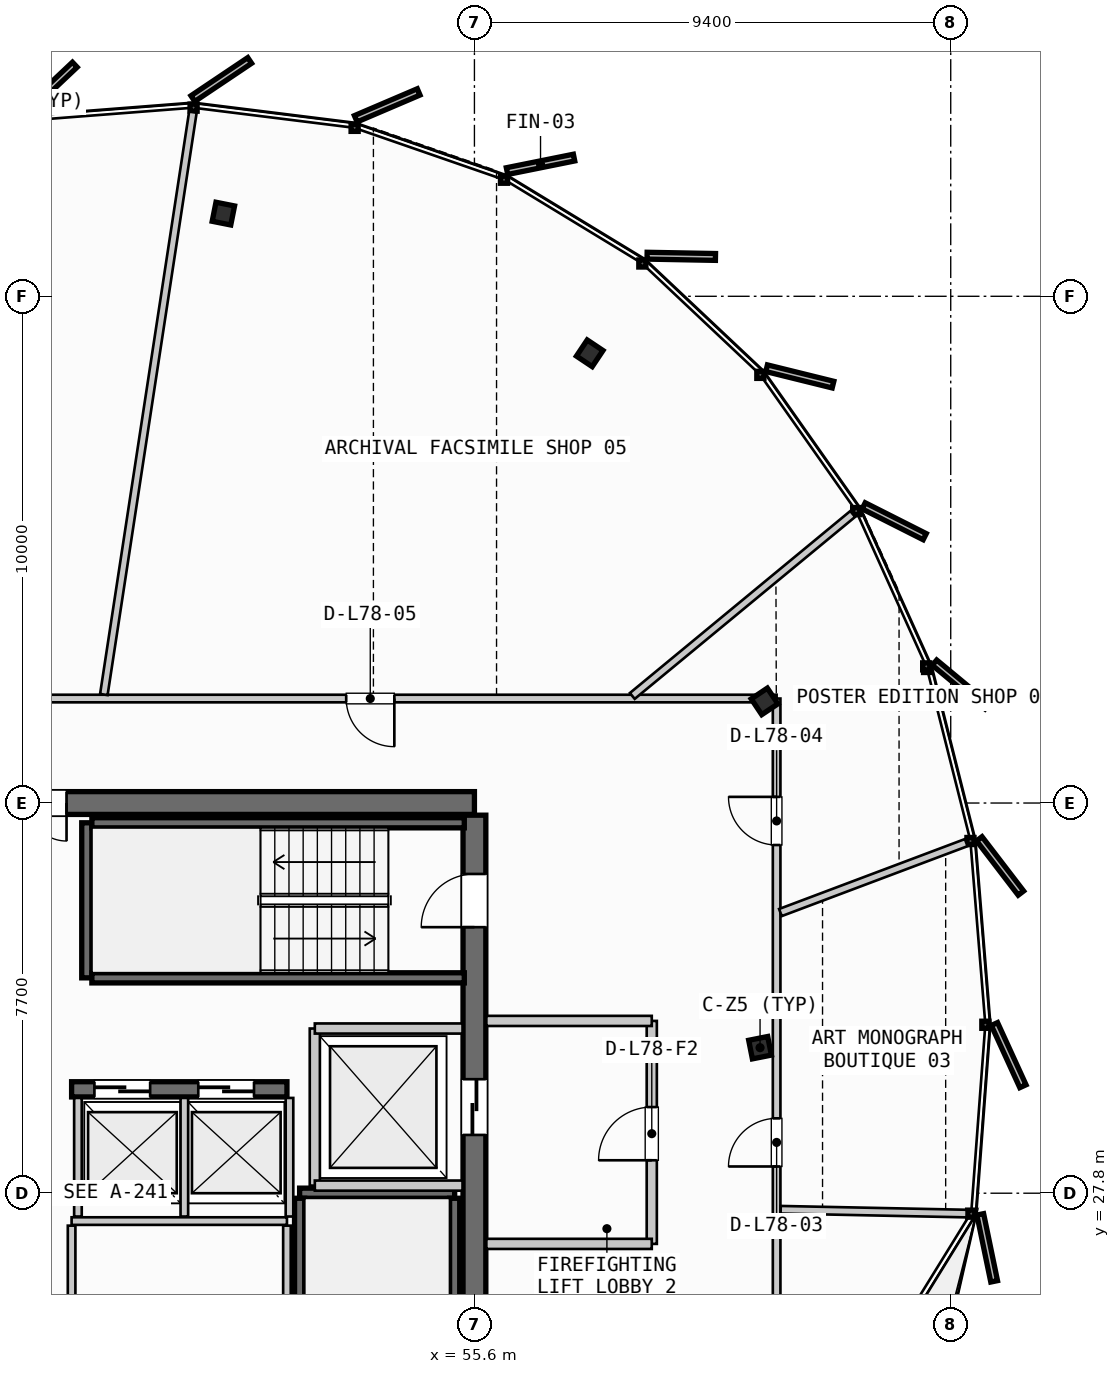
"""IFC4 building model, lengths in metres.
Left out: names, types, materials, properties, quantities, classifications, styles, units other than length and angle.
Written with IfcOpenShell. Run it as: python <this file> out.ifc"""

import sys

from ifc_helpers import new_model, si_unit, direction, frame, frame_2d, origin, origin_2d, place, context, subcontext, project, spatial, rectangle, i_section, extrude, source, transform, mapped, element, fill, save


model = new_model("IFC4")
c1 = context("Model", 3, precision=1e-05, world=origin(), true_north=direction((0.0, 1.0)))
c2 = subcontext(c1, "Body", "Model", "MODEL_VIEW")
j1 = project(units=[si_unit("LENGTHUNIT", "METRE"), si_unit("PLANEANGLEUNIT", "RADIAN")], contexts=[c1])
p1 = place(None, origin())
s1 = spatial("IfcSite", under=j1, at=p1, CompositionType="ELEMENT")
p2 = place(p1, origin())
s2 = spatial("IfcBuilding", under=s1, at=p2, CompositionType="ELEMENT")
p3 = place(p2, frame((0.0, 0.0, 293.95)))
s3 = spatial("IfcBuildingStorey", under=s2, at=p3, CompositionType="ELEMENT", Elevation=293.95)
p4 = place(p3, frame((55.6, 35.5, 0.0), z_axis=(0.0, 0.0, 1.0), x_axis=(-1.0, 0.0, 0.0)))
e1 = element("IfcWall", 1, at=p4, inside=s3, PredefinedType="SHEAR", context=c2, shape_type="SweptSolid", body=[
    extrude(rectangle(XDim=17.6, YDim=0.45, at=frame_2d((8.8, 0.0))), origin(), (0.0, 0.0, 1.0), 3.21),
])
p5 = place(p4, frame((8.05, 0.0, 0.0)))
e2 = element("IfcOpeningElement", 2, at=p5, cuts=e1, PredefinedType="OPENING", context=c2, shape_type="SweptSolid", body=[
    extrude(rectangle(XDim=1.5, YDim=2.2, at=frame_2d((0.75, 1.1))), frame((0.0, 0.235, 0.0), z_axis=(0.0, -1.0, 0.0), x_axis=(1.0, 0.0, 0.0)), (0.0, 0.0, 1.0), 0.47),
])
p6 = place(p4, frame((15.85, 0.0, 0.0)))
e3 = element("IfcOpeningElement", 3, at=p6, cuts=e1, PredefinedType="OPENING", context=c2, shape_type="SweptSolid", body=[
    extrude(rectangle(XDim=0.85, YDim=2.15, at=frame_2d((0.425, 1.075))), frame((0.0, 0.235, 0.0), z_axis=(0.0, -1.0, 0.0), x_axis=(1.0, 0.0, 0.0)), (0.0, 0.0, 1.0), 0.47),
])
p7 = place(p4, frame((14.35, 0.0, 0.0)))
e4 = element("IfcOpeningElement", 4, at=p7, cuts=e1, PredefinedType="OPENING", context=c2, shape_type="SweptSolid", body=[
    extrude(rectangle(XDim=0.85, YDim=2.15, at=frame_2d((0.425, 1.075))), frame((0.0, 0.235, 0.0), z_axis=(0.0, -1.0, 0.0), x_axis=(1.0, 0.0, 0.0)), (0.0, 0.0, 1.0), 0.47),
])
p8 = place(p4, frame((12.3, 0.0, 0.0)))
e5 = element("IfcOpeningElement", 5, at=p8, cuts=e1, PredefinedType="OPENING", context=c2, shape_type="SweptSolid", body=[
    extrude(rectangle(XDim=0.95, YDim=2.15, at=frame_2d((0.475, 1.075))), frame((0.0, 0.235, 0.0), z_axis=(0.0, -1.0, 0.0), x_axis=(1.0, 0.0, 0.0)), (0.0, 0.0, 1.0), 0.47),
])
p9 = place(p4, frame((10.2, 0.0, 0.0)))
e6 = element("IfcOpeningElement", 6, at=p9, cuts=e1, PredefinedType="OPENING", context=c2, shape_type="SweptSolid", body=[
    extrude(rectangle(XDim=0.9, YDim=2.15, at=frame_2d((0.45, 1.075))), frame((0.0, 0.235, 0.0), z_axis=(0.0, -1.0, 0.0), x_axis=(1.0, 0.0, 0.0)), (0.0, 0.0, 1.0), 0.47),
])
p10 = place(p3, frame((55.6, 20.34, 0.0), z_axis=(0.0, 0.0, 1.0), x_axis=(0.0, 1.0, 0.0)))
e7 = element("IfcWall", 7, at=p10, inside=s3, PredefinedType="SHEAR", context=c2, shape_type="SweptSolid", body=[
    extrude(rectangle(XDim=14.92, YDim=0.45, at=frame_2d((7.46, 0.0))), origin(), (0.0, 0.0, 1.0), 3.21),
])
p11 = place(p10, frame((12.71, 0.0, 0.0)))
e8 = element("IfcOpeningElement", 8, at=p11, cuts=e7, PredefinedType="OPENING", context=c2, shape_type="SweptSolid", body=[
    extrude(rectangle(XDim=1.05, YDim=2.15, at=frame_2d((0.525, 1.075))), frame((0.0, 0.235, 0.0), z_axis=(0.0, -1.0, 0.0), x_axis=(1.0, 0.0, 0.0)), (0.0, 0.0, 1.0), 0.47),
])
p12 = place(p10, frame((8.61, 0.0, 0.0)))
e9 = element("IfcOpeningElement", 9, at=p12, cuts=e7, PredefinedType="OPENING", context=c2, shape_type="SweptSolid", body=[
    extrude(rectangle(XDim=1.1, YDim=2.2, at=frame_2d((0.55, 1.1))), frame((0.0, 0.235, 0.0), z_axis=(0.0, -1.0, 0.0), x_axis=(1.0, 0.0, 0.0)), (0.0, 0.0, 1.0), 0.47),
])
p13 = place(p3, frame((47.65, 29.85, 0.0), z_axis=(0.0, 0.0, 1.0), x_axis=(1.0, 0.0, 0.0)))
e10 = element("IfcWall", 10, at=p13, inside=s3, PredefinedType="SHEAR", context=c2, shape_type="SweptSolid", body=[
    extrude(rectangle(XDim=4.25, YDim=0.3, at=frame_2d((2.125, 0.0))), origin(), (0.0, 0.0, 1.0), 3.21),
])
p14 = place(p13, frame((0.45, 0.0, 0.0)))
e11 = element("IfcOpeningElement", 11, at=p14, cuts=e10, PredefinedType="OPENING", context=c2, shape_type="SweptSolid", body=[
    extrude(rectangle(XDim=1.1, YDim=2.2, at=frame_2d((0.55, 1.1))), frame((0.0, 0.16, 0.0), z_axis=(0.0, -1.0, 0.0), x_axis=(1.0, 0.0, 0.0)), (0.0, 0.0, 1.0), 0.32),
])
p15 = place(p13, frame((2.5, 0.0, 0.0)))
e12 = element("IfcOpeningElement", 12, at=p15, cuts=e10, PredefinedType="OPENING", context=c2, shape_type="SweptSolid", body=[
    extrude(rectangle(XDim=1.1, YDim=2.2, at=frame_2d((0.55, 1.1))), frame((0.0, 0.16, 0.0), z_axis=(0.0, -1.0, 0.0), x_axis=(1.0, 0.0, 0.0)), (0.0, 0.0, 1.0), 0.32),
])
m1 = source(origin(), c2, "Body", "SweptSolid", [
    extrude(i_section(OverallWidth=0.374, OverallDepth=0.383, WebThickness=0.017, FlangeThickness=0.026, FilletRadius=0.015, at=origin_2d()), origin(), (0.0, 0.0, 1.0), 3.21),
])
for number, where, z_axis, x_axis in (
    (13, (61.237, 30.672, 0.0), (0.0, 0.0, 1.0), (0.981, 0.195, 0.0)),
    (14, (61.326, 37.506, 0.0), (0.0, 0.0, 1.0), (0.831, 0.556, 0.0)),
    (15, (57.875, 44.375, 0.0), (0.0, 0.0, 1.0), (0.556, 0.831, 0.0)),
    (16, (50.645, 47.132, 0.0), (0.0, 0.0, 1.0), (0.195, 0.981, 0.0)),
):
    element("IfcColumn", number, at=place(p3, frame(where, z_axis=z_axis, x_axis=x_axis)), inside=s3, PredefinedType="COLUMN", context=c2, shape_type="MappedRepresentation", body=[
        mapped(m1, transform((0.0, 0.0, 0.0), scale=1.0)),
    ])
p16 = place(p3, frame((52.15, 27.8, 0.0), z_axis=(0.0, 0.0, 1.0), x_axis=(1.0, 0.0, 0.0)))
e17 = element("IfcWall", 17, at=p16, inside=s3, PredefinedType="SHEAR", context=c2, shape_type="SweptSolid", body=[
    extrude(rectangle(XDim=3.06, YDim=0.2, at=frame_2d((1.53, 0.0))), origin(), (0.0, 0.0, 1.0), 3.21),
])
for number, where, z_axis, x_axis in (
    (18, (55.21, 27.7, 0.0), (0.0, 0.0, 1.0), (0.0, -1.0, 0.0)),
    (19, (52.15, 20.35, 0.0), (0.0, 0.0, 1.0), (0.0, 1.0, 0.0)),
):
    element("IfcWall", number, at=place(p3, frame(where, z_axis=z_axis, x_axis=x_axis)), inside=s3, PredefinedType="SHEAR", context=c2, shape_type="SweptSolid", body=[
        extrude(rectangle(XDim=7.35, YDim=0.2, at=frame_2d((3.675, 0.0))), origin(), (0.0, 0.0, 1.0), 3.21),
    ])
p17 = place(p3, frame((47.95, 32.05, 0.0), z_axis=(0.0, 0.0, 1.0), x_axis=(0.0, 1.0, 0.0)))
e20 = element("IfcWall", 20, at=p17, inside=s3, PredefinedType="SHEAR", context=c2, shape_type="SweptSolid", body=[
    extrude(rectangle(XDim=3.06, YDim=0.2, at=frame_2d((1.53, 0.0))), origin(), (0.0, 0.0, 1.0), 3.21),
])
for number, where, z_axis, x_axis in (
    (21, (48.05, 35.11, 0.0), (0.0, 0.0, 1.0), (1.0, 0.0, 0.0)),
    (22, (55.4, 32.05, 0.0), (0.0, 0.0, 1.0), (-1.0, 0.0, 0.0)),
):
    element("IfcWall", number, at=place(p3, frame(where, z_axis=z_axis, x_axis=x_axis)), inside=s3, PredefinedType="SHEAR", context=c2, shape_type="SweptSolid", body=[
        extrude(rectangle(XDim=7.35, YDim=0.2, at=frame_2d((3.675, 0.0))), origin(), (0.0, 0.0, 1.0), 3.21),
    ])
p18 = place(p3, frame((52.45, 27.95, 0.0), z_axis=(0.0, 0.0, 1.0), x_axis=(0.0, 1.0, 0.0)))
e23 = element("IfcWall", 23, at=p18, inside=s3, PredefinedType="PARTITIONING", context=c2, shape_type="SweptSolid", body=[
    extrude(rectangle(XDim=3.1, YDim=0.2, at=frame_2d((1.55, 0.0))), origin(), (0.0, 0.0, 1.0), 2.315),
])
for number, where, z_axis, x_axis in (
    (24, (52.45, 27.95, 0.0), (0.0, 0.0, 1.0), (1.0, 0.0, 0.0)),
    (25, (52.45, 31.05, 0.0), (0.0, 0.0, 1.0), (1.0, 0.0, 0.0)),
):
    element("IfcWall", number, at=place(p3, frame(where, z_axis=z_axis, x_axis=x_axis)), inside=s3, PredefinedType="PARTITIONING", context=c2, shape_type="SweptSolid", body=[
        extrude(rectangle(XDim=2.915, YDim=0.2, at=frame_2d((1.458, 0.0))), origin(), (0.0, 0.0, 1.0), 2.315),
    ])
p19 = place(p3, frame((59.1, 26.8, 0.0), z_axis=(0.0, 0.0, 1.0), x_axis=(0.0, 1.0, 0.0)))
e26 = element("IfcWall", 26, at=p19, inside=s3, PredefinedType="PARTITIONING", context=c2, shape_type="SweptSolid", body=[
    extrude(rectangle(XDim=4.4, YDim=0.2, at=frame_2d((2.2, 0.0))), origin(), (0.0, 0.0, 1.0), 2.315),
])
p20 = place(p19, frame((1.65, 0.0, 0.0)))
e27 = element("IfcOpeningElement", 27, at=p20, cuts=e26, PredefinedType="OPENING", context=c2, shape_type="SweptSolid", body=[
    extrude(rectangle(XDim=1.05, YDim=2.15, at=frame_2d((0.525, 1.075))), frame((0.0, 0.11, 0.0), z_axis=(0.0, -1.0, 0.0), x_axis=(1.0, 0.0, 0.0)), (0.0, 0.0, 1.0), 0.22),
])
for number, where, z_axis, x_axis in (
    (28, (55.835, 26.8, 0.0), (0.0, 0.0, 1.0), (1.0, 0.0, 0.0)),
    (29, (55.835, 31.2, 0.0), (0.0, 0.0, 1.0), (1.0, 0.0, 0.0)),
):
    element("IfcWall", number, at=place(p3, frame(where, z_axis=z_axis, x_axis=x_axis)), inside=s3, PredefinedType="PARTITIONING", context=c2, shape_type="SweptSolid", body=[
        extrude(rectangle(XDim=3.265, YDim=0.2, at=frame_2d((1.633, 0.0))), origin(), (0.0, 0.0, 1.0), 2.315),
    ])
p21 = place(p3, frame((47.65, 27.25, 0.0), z_axis=(0.0, 0.0, 1.0), x_axis=(1.0, 0.0, 0.0)))
e30 = element("IfcWall", 30, at=p21, inside=s3, PredefinedType="PARTITIONING", context=c2, shape_type="SweptSolid", body=[
    extrude(rectangle(XDim=4.25, YDim=0.15, at=frame_2d((2.125, 0.0))), origin(), (0.0, 0.0, 1.0), 2.315),
])
for number, where, z_axis, x_axis in (
    (31, (47.65, 24.92, 0.0), (0.0, 0.0, 1.0), (0.0, 1.0, 0.0)),
    (32, (51.9, 24.92, 0.0), (0.0, 0.0, 1.0), (0.0, 1.0, 0.0)),
):
    element("IfcWall", number, at=place(p3, frame(where, z_axis=z_axis, x_axis=x_axis)), inside=s3, PredefinedType="PARTITIONING", context=c2, shape_type="SweptSolid", body=[
        extrude(rectangle(XDim=2.24, YDim=0.15, at=frame_2d((1.12, 0.0))), origin(), (0.0, 0.0, 1.0), 2.315),
    ])
for number, where, z_axis, x_axis in (
    (33, (47.775, 27.34, 0.0), (0.0, 0.0, 1.0), (0.0, 1.0, 0.0)),
    (34, (49.875, 27.34, 0.0), (0.0, 0.0, 1.0), (0.0, 1.0, 0.0)),
    (35, (51.95, 27.34, 0.0), (0.0, 0.0, 1.0), (0.0, 1.0, 0.0)),
):
    element("IfcWall", number, at=place(p3, frame(where, z_axis=z_axis, x_axis=x_axis)), inside=s3, PredefinedType="PARTITIONING", context=c2, shape_type="SweptSolid", body=[
        extrude(rectangle(XDim=2.34, YDim=0.15, at=frame_2d((1.17, 0.0))), origin(), (0.0, 0.0, 1.0), 2.315),
    ])
p22 = place(p3, frame((61.564, 18.269, 0.0), z_axis=(0.0, 0.0, 1.0), x_axis=(0.0, 1.0, 0.0)))
e36 = element("IfcWall", 36, at=p22, inside=s3, PredefinedType="PARTITIONING", context=c2, shape_type="SweptSolid", body=[
    extrude(rectangle(XDim=19.293, YDim=0.15, at=frame_2d((9.646, 0.0))), origin(), (0.0, 0.0, 1.0), 2.315),
])
p23 = place(p22, frame((10.058, 0.0, 0.0)))
e37 = element("IfcOpeningElement", 37, at=p23, cuts=e36, PredefinedType="OPENING", context=c2, shape_type="SweptSolid", body=[
    extrude(rectangle(XDim=0.95, YDim=2.15, at=frame_2d((0.475, 1.075))), frame((0.0, 0.085, 0.0), z_axis=(0.0, -1.0, 0.0), x_axis=(1.0, 0.0, 0.0)), (0.0, 0.0, 1.0), 0.17),
])
p24 = place(p22, frame((16.402, 0.0, 0.0)))
e38 = element("IfcOpeningElement", 38, at=p24, cuts=e36, PredefinedType="OPENING", context=c2, shape_type="SweptSolid", body=[
    extrude(rectangle(XDim=0.95, YDim=2.15, at=frame_2d((0.475, 1.075))), frame((0.0, 0.085, 0.0), z_axis=(0.0, -1.0, 0.0), x_axis=(1.0, 0.0, 0.0)), (0.0, 0.0, 1.0), 0.17),
])
p25 = place(p3, frame((61.564, 37.562, 0.0), z_axis=(0.0, 0.0, 1.0), x_axis=(-1.0, 0.0, 0.0)))
e39 = element("IfcWall", 39, at=p25, inside=s3, PredefinedType="PARTITIONING", context=c2, shape_type="SweptSolid", body=[
    extrude(rectangle(XDim=30.274, YDim=0.15, at=frame_2d((15.137, 0.0))), origin(), (0.0, 0.0, 1.0), 2.315),
])
p26 = place(p25, frame((7.545, 0.0, 0.0)))
e40 = element("IfcOpeningElement", 40, at=p26, cuts=e39, PredefinedType="OPENING", context=c2, shape_type="SweptSolid", body=[
    extrude(rectangle(XDim=0.95, YDim=2.15, at=frame_2d((0.475, 1.075))), frame((0.0, 0.085, 0.0), z_axis=(0.0, -1.0, 0.0), x_axis=(1.0, 0.0, 0.0)), (0.0, 0.0, 1.0), 0.17),
])
p27 = place(p25, frame((20.04, 0.0, 0.0)))
e41 = element("IfcOpeningElement", 41, at=p27, cuts=e39, PredefinedType="OPENING", context=c2, shape_type="SweptSolid", body=[
    extrude(rectangle(XDim=0.95, YDim=2.15, at=frame_2d((0.475, 1.075))), frame((0.0, 0.085, 0.0), z_axis=(0.0, -1.0, 0.0), x_axis=(1.0, 0.0, 0.0)), (0.0, 0.0, 1.0), 0.17),
])
p28 = place(p3, frame((61.644, 27.474, 0.0), z_axis=(0.0, 0.0, 1.0), x_axis=(0.999787363951, -0.020621030128, 0.0)))
e42 = element("IfcWall", 42, at=p28, inside=s3, PredefinedType="PARTITIONING", context=c2, shape_type="SweptSolid", body=[
    extrude(rectangle(XDim=3.67, YDim=0.15, at=frame_2d((1.835, 0.0))), origin(), (0.0, 0.0, 1.0), 2.315),
])
p29 = place(p3, frame((61.639, 33.339, 0.0), z_axis=(0.0, 0.0, 1.0), x_axis=(0.935913629977, 0.352229580279, 0.0)))
e43 = element("IfcWall", 43, at=p29, inside=s3, PredefinedType="PARTITIONING", context=c2, shape_type="SweptSolid", body=[
    extrude(rectangle(XDim=3.917, YDim=0.15, at=frame_2d((1.959, 0.0))), origin(), (0.0, 0.0, 1.0), 2.315),
])
p30 = place(p3, frame((58.716, 37.613, 0.0), z_axis=(0.0, 0.0, 1.0), x_axis=(0.771104958494, 0.636708051611, 0.0)))
e44 = element("IfcWall", 44, at=p30, inside=s3, PredefinedType="PARTITIONING", context=c2, shape_type="SweptSolid", body=[
    extrude(rectangle(XDim=5.64, YDim=0.15, at=frame_2d((2.82, 0.0))), origin(), (0.0, 0.0, 1.0), 2.315),
])
p31 = place(p3, frame((48.286, 37.641, 0.0), z_axis=(0.0, 0.0, 1.0), x_axis=(0.151178163671, 0.988506531506, 0.0)))
e45 = element("IfcWall", 45, at=p31, inside=s3, PredefinedType="PARTITIONING", context=c2, shape_type="SweptSolid", body=[
    extrude(rectangle(XDim=11.626, YDim=0.15, at=frame_2d((5.813, 0.0))), origin(), (0.0, 0.0, 1.0), 2.315),
])
m2 = source(origin(), c2, "Body", "SweptSolid", [
    extrude(rectangle(XDim=1.05, YDim=2.15, at=frame_2d((0.525, 1.075))), frame((0.0, 0.025, 0.0), z_axis=(0.0, -1.0, 0.0), x_axis=(1.0, 0.0, 0.0)), (0.0, 0.0, 1.0), 0.05),
])
p32 = place(p11, origin())
e46 = element("IfcDoor", 46, at=p32, inside=s3, OperationType="SINGLE_SWING_LEFT", PredefinedType="DOOR", context=c2, shape_type="MappedRepresentation", body=[
    mapped(m2, transform((0.0, 0.0, 0.0), scale=1.0)),
])
fill(e8, e46)
m3 = source(origin(), c2, "Body", "SweptSolid", [
    extrude(rectangle(XDim=1.5, YDim=2.2, at=frame_2d((0.75, 1.1))), frame((0.0, 0.025, 0.0), z_axis=(0.0, -1.0, 0.0), x_axis=(1.0, 0.0, 0.0)), (0.0, 0.0, 1.0), 0.05),
])
p33 = place(p5, origin())
e47 = element("IfcDoor", 47, at=p33, inside=s3, OperationType="DOUBLE_DOOR_SINGLE_SWING", PredefinedType="DOOR", context=c2, shape_type="MappedRepresentation", body=[
    mapped(m3, transform((0.0, 0.0, 0.0), scale=1.0)),
])
fill(e2, e47)
m4 = source(origin(), c2, "Body", "SweptSolid", [
    extrude(rectangle(XDim=1.1, YDim=2.2, at=frame_2d((0.55, 1.1))), frame((0.0, 0.025, 0.0), z_axis=(0.0, -1.0, 0.0), x_axis=(1.0, 0.0, 0.0)), (0.0, 0.0, 1.0), 0.05),
])
p34 = place(p12, origin())
e48 = element("IfcDoor", 48, at=p34, inside=s3, OperationType="SLIDING_TO_RIGHT", PredefinedType="DOOR", context=c2, shape_type="MappedRepresentation", body=[
    mapped(m4, transform((0.0, 0.0, 0.0), scale=1.0)),
])
fill(e9, e48)
p35 = place(p14, origin())
e49 = element("IfcDoor", 49, at=p35, inside=s3, OperationType="SLIDING_TO_LEFT", PredefinedType="DOOR", context=c2, shape_type="MappedRepresentation", body=[
    mapped(m4, transform((0.0, 0.0, 0.0), scale=1.0)),
])
fill(e11, e49)
p36 = place(p15, origin())
e50 = element("IfcDoor", 50, at=p36, inside=s3, OperationType="SLIDING_TO_LEFT", PredefinedType="DOOR", context=c2, shape_type="MappedRepresentation", body=[
    mapped(m4, transform((0.0, 0.0, 0.0), scale=1.0)),
])
fill(e12, e50)
p37 = place(p20, origin())
e51 = element("IfcDoor", 51, at=p37, inside=s3, OperationType="SINGLE_SWING_LEFT", PredefinedType="DOOR", context=c2, shape_type="MappedRepresentation", body=[
    mapped(m2, transform((0.0, 0.0, 0.0), scale=1.0)),
])
fill(e27, e51)
m5 = source(origin(), c2, "Body", "SweptSolid", [
    extrude(rectangle(XDim=0.95, YDim=2.15, at=frame_2d((0.475, 1.075))), frame((0.0, 0.025, 0.0), z_axis=(0.0, -1.0, 0.0), x_axis=(1.0, 0.0, 0.0)), (0.0, 0.0, 1.0), 0.05),
])
p38 = place(p23, origin())
e52 = element("IfcDoor", 52, at=p38, inside=s3, OperationType="SINGLE_SWING_LEFT", PredefinedType="DOOR", context=c2, shape_type="MappedRepresentation", body=[
    mapped(m5, transform((0.0, 0.0, 0.0), scale=1.0)),
])
fill(e37, e52)
p39 = place(p24, origin())
e53 = element("IfcDoor", 53, at=p39, inside=s3, OperationType="SINGLE_SWING_RIGHT", PredefinedType="DOOR", context=c2, shape_type="MappedRepresentation", body=[
    mapped(m5, transform((0.0, 0.0, 0.0), scale=1.0)),
])
fill(e38, e53)
p40 = place(p26, origin())
e54 = element("IfcDoor", 54, at=p40, inside=s3, OperationType="SINGLE_SWING_LEFT", PredefinedType="DOOR", context=c2, shape_type="MappedRepresentation", body=[
    mapped(m5, transform((0.0, 0.0, 0.0), scale=1.0)),
])
fill(e40, e54)
save(model, sys.argv[1])
